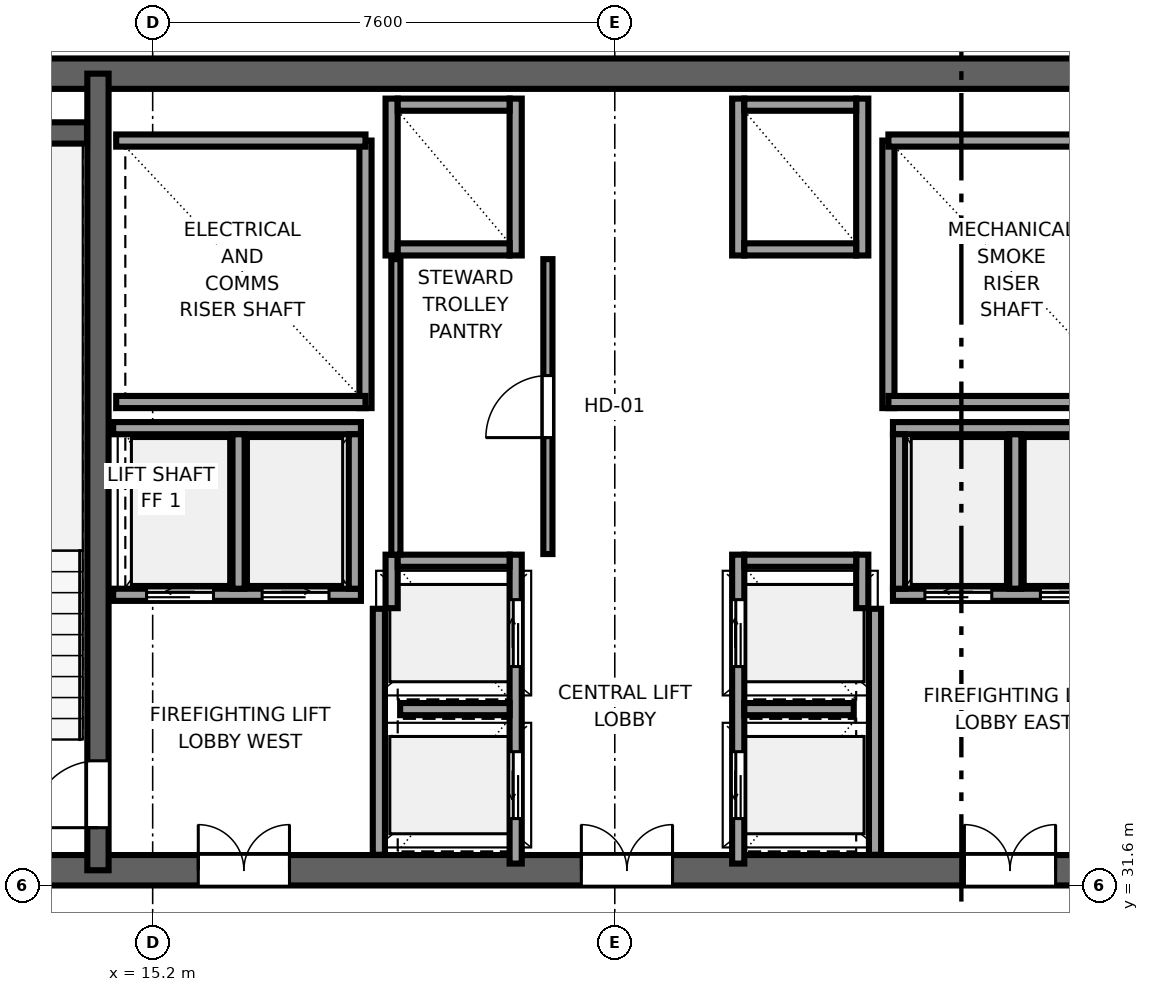
"""IFC4 building model, lengths in metres.
Left out: names, types, materials, properties, quantities, classifications, styles, units other than length and angle.
Written with IfcOpenShell. Run it as: python <this file> out.ifc"""

import sys

from ifc_helpers import new_model, si_unit, direction, frame, frame_2d, origin, place, context, subcontext, project, spatial, rectangle, extrude, source, transform, mapped, element, fill, save


model = new_model("IFC4")
c1 = context("Model", 3, precision=1e-05, world=origin(), true_north=direction((0.0, 1.0)))
c2 = subcontext(c1, "Body", "Model", "MODEL_VIEW")
j1 = project(units=[si_unit("LENGTHUNIT", "METRE"), si_unit("PLANEANGLEUNIT", "RADIAN")], contexts=[c1])
p1 = place(None, origin())
s1 = spatial("IfcSite", under=j1, at=p1, CompositionType="ELEMENT")
p2 = place(p1, origin())
s2 = spatial("IfcBuilding", under=s1, at=p2, CompositionType="ELEMENT")
p3 = place(p2, frame((0.0, 0.0, 262.95)))
s3 = spatial("IfcBuildingStorey", under=s2, at=p3, CompositionType="ELEMENT", Elevation=262.95)
p4 = place(p3, frame((10.0, 31.85, 0.0), z_axis=(0.0, 0.0, 1.0), x_axis=(1.0, 0.0, 0.0)))
e1 = element("IfcWall", 1, at=p4, inside=s3, PredefinedType="SHEAR", context=c2, shape_type="SweptSolid", body=[
    extrude(rectangle(XDim=26.0, YDim=0.5, at=frame_2d((13.0, 0.0))), origin(), (0.0, 0.0, 1.0), 3.55),
])
p5 = place(p4, frame((7.45, 0.0, 0.0), z_axis=(0.0, 0.0, 1.0), x_axis=(-1.0, 0.0, 0.0)))
e2 = element("IfcOpeningElement", 2, at=p5, cuts=e1, PredefinedType="OPENING", context=c2, shape_type="SweptSolid", body=[
    extrude(rectangle(XDim=1.5, YDim=2.04, at=frame_2d((0.75, 1.02))), frame((0.0, 0.26, 0.0), z_axis=(0.0, -1.0, 0.0), x_axis=(1.0, 0.0, 0.0)), (0.0, 0.0, 1.0), 0.52),
])
p6 = place(p4, frame((13.75, 0.0, 0.0), z_axis=(0.0, 0.0, 1.0), x_axis=(-1.0, 0.0, 0.0)))
e3 = element("IfcOpeningElement", 3, at=p6, cuts=e1, PredefinedType="OPENING", context=c2, shape_type="SweptSolid", body=[
    extrude(rectangle(XDim=1.5, YDim=2.04, at=frame_2d((0.75, 1.02))), frame((0.0, 0.26, 0.0), z_axis=(0.0, -1.0, 0.0), x_axis=(1.0, 0.0, 0.0)), (0.0, 0.0, 1.0), 0.52),
])
p7 = place(p4, frame((20.05, 0.0, 0.0), z_axis=(0.0, 0.0, 1.0), x_axis=(-1.0, 0.0, 0.0)))
e4 = element("IfcOpeningElement", 4, at=p7, cuts=e1, PredefinedType="OPENING", context=c2, shape_type="SweptSolid", body=[
    extrude(rectangle(XDim=1.5, YDim=2.04, at=frame_2d((0.75, 1.02))), frame((0.0, 0.26, 0.0), z_axis=(0.0, -1.0, 0.0), x_axis=(1.0, 0.0, 0.0)), (0.0, 0.0, 1.0), 0.52),
])
p8 = place(p3, frame((10.0, 44.95, 0.0), z_axis=(0.0, 0.0, 1.0), x_axis=(1.0, 0.0, 0.0)))
e5 = element("IfcWall", 5, at=p8, inside=s3, PredefinedType="SHEAR", context=c2, shape_type="SweptSolid", body=[
    extrude(rectangle(XDim=26.0, YDim=0.5, at=frame_2d((13.0, 0.0))), origin(), (0.0, 0.0, 1.0), 3.55),
])
p9 = place(p3, frame((14.3, 31.85, 0.0), z_axis=(0.0, 0.0, 1.0), x_axis=(0.0, 1.0, 0.0)))
e6 = element("IfcWall", 6, at=p9, inside=s3, PredefinedType="SHEAR", context=c2, shape_type="SweptSolid", body=[
    extrude(rectangle(XDim=13.1, YDim=0.35, at=frame_2d((6.55, 0.0))), origin(), (0.0, 0.0, 1.0), 3.55),
])
p10 = place(p9, frame((0.7, 0.0, 0.0)))
e7 = element("IfcOpeningElement", 7, at=p10, cuts=e6, PredefinedType="OPENING", context=c2, shape_type="SweptSolid", body=[
    extrude(rectangle(XDim=1.1, YDim=2.12, at=frame_2d((0.55, 1.06))), frame((0.0, 0.185, 0.0), z_axis=(0.0, -1.0, 0.0), x_axis=(1.0, 0.0, 0.0)), (0.0, 0.0, 1.0), 0.37),
])
p11 = place(p3, frame((10.52, 43.975, 0.0), z_axis=(0.0, 0.0, 1.0), x_axis=(1.0, 0.0, 0.0)))
e8 = element("IfcWall", 8, at=p11, inside=s3, PredefinedType="SHEAR", context=c2, shape_type="SweptSolid", body=[
    extrude(rectangle(XDim=3.6, YDim=0.35, at=frame_2d((1.8, 0.0))), origin(), (0.0, 0.0, 1.0), 3.55),
])
p12 = place(p3, frame((18.7, 39.45, 0.0), z_axis=(0.0, 0.0, 1.0), x_axis=(0.0, 1.0, 0.0)))
e9 = element("IfcWall", 9, at=p12, inside=s3, PredefinedType="SOLIDWALL", context=c2, shape_type="SweptSolid", body=[
    extrude(rectangle(XDim=4.4, YDim=0.2, at=frame_2d((2.2, 0.0))), origin(), (0.0, 0.0, 1.0), 3.37),
])
for number, where, z_axis, x_axis in (
    (10, (14.6, 39.55, 0.0), (0.0, 0.0, 1.0), (1.0, 0.0, 0.0)),
    (11, (14.6, 43.85, 0.0), (0.0, 0.0, 1.0), (1.0, 0.0, 0.0)),
):
    element("IfcWall", number, at=place(p3, frame(where, z_axis=z_axis, x_axis=x_axis)), inside=s3, PredefinedType="SOLIDWALL", context=c2, shape_type="SweptSolid", body=[
        extrude(rectangle(XDim=4.1, YDim=0.2, at=frame_2d((2.05, 0.0))), origin(), (0.0, 0.0, 1.0), 3.37),
    ])
p13 = place(p3, frame((27.3, 39.45, 0.0), z_axis=(0.0, 0.0, 1.0), x_axis=(0.0, 1.0, 0.0)))
e12 = element("IfcWall", 12, at=p13, inside=s3, PredefinedType="SOLIDWALL", context=c2, shape_type="SweptSolid", body=[
    extrude(rectangle(XDim=4.4, YDim=0.2, at=frame_2d((2.2, 0.0))), origin(), (0.0, 0.0, 1.0), 3.37),
])
for number, where, z_axis, x_axis in (
    (13, (27.3, 39.55, 0.0), (0.0, 0.0, 1.0), (1.0, 0.0, 0.0)),
    (14, (27.3, 43.85, 0.0), (0.0, 0.0, 1.0), (1.0, 0.0, 0.0)),
):
    element("IfcWall", number, at=place(p3, frame(where, z_axis=z_axis, x_axis=x_axis)), inside=s3, PredefinedType="SOLIDWALL", context=c2, shape_type="SweptSolid", body=[
        extrude(rectangle(XDim=4.1, YDim=0.2, at=frame_2d((2.05, 0.0))), origin(), (0.0, 0.0, 1.0), 3.37),
    ])
for number, where, z_axis, x_axis in (
    (15, (18.92, 32.104, 0.0), (0.0, 0.0, 1.0), (0.0, 1.0, 0.0)),
    (16, (27.08, 32.104, 0.0), (0.0, 0.0, 1.0), (0.0, 1.0, 0.0)),
):
    element("IfcWall", number, at=place(p3, frame(where, z_axis=z_axis, x_axis=x_axis)), inside=s3, PredefinedType="SOLIDWALL", context=c2, shape_type="SweptSolid", body=[
        extrude(rectangle(XDim=4.046, YDim=0.2, at=frame_2d((2.023, 0.0))), origin(), (0.0, 0.0, 1.0), 3.37),
    ])
p14 = place(p3, frame((21.17, 31.96, 0.0), z_axis=(0.0, 0.0, 1.0), x_axis=(0.0, 1.0, 0.0)))
e17 = element("IfcWall", 17, at=p14, inside=s3, PredefinedType="SOLIDWALL", context=c2, shape_type="SweptSolid", body=[
    extrude(rectangle(XDim=5.08, YDim=0.2, at=frame_2d((2.54, 0.0))), origin(), (0.0, 0.0, 1.0), 3.37),
])
p15 = place(p14, frame((0.74, 0.0, 0.0)))
e18 = element("IfcOpeningElement", 18, at=p15, cuts=e17, PredefinedType="OPENING", context=c2, shape_type="SweptSolid", body=[
    extrude(rectangle(XDim=1.1, YDim=2.12, at=frame_2d((0.55, 1.06))), frame((0.0, 0.11, 0.0), z_axis=(0.0, -1.0, 0.0), x_axis=(1.0, 0.0, 0.0)), (0.0, 0.0, 1.0), 0.22),
])
p16 = place(p14, frame((3.24, 0.0, 0.0)))
e19 = element("IfcOpeningElement", 19, at=p16, cuts=e17, PredefinedType="OPENING", context=c2, shape_type="SweptSolid", body=[
    extrude(rectangle(XDim=1.1, YDim=2.12, at=frame_2d((0.55, 1.06))), frame((0.0, 0.11, 0.0), z_axis=(0.0, -1.0, 0.0), x_axis=(1.0, 0.0, 0.0)), (0.0, 0.0, 1.0), 0.22),
])
p17 = place(p3, frame((19.13, 36.16, 0.0), z_axis=(0.0, 0.0, 1.0), x_axis=(0.0, 1.0, 0.0)))
e20 = element("IfcWall", 20, at=p17, inside=s3, PredefinedType="SOLIDWALL", context=c2, shape_type="SweptSolid", body=[
    extrude(rectangle(XDim=0.88, YDim=0.2, at=frame_2d((0.44, 0.0))), origin(), (0.0, 0.0, 1.0), 3.37),
])
p18 = place(p3, frame((19.23, 36.94, 0.0), z_axis=(0.0, 0.0, 1.0), x_axis=(1.0, 0.0, 0.0)))
e21 = element("IfcWall", 21, at=p18, inside=s3, PredefinedType="SOLIDWALL", context=c2, shape_type="SweptSolid", body=[
    extrude(rectangle(XDim=1.84, YDim=0.2, at=frame_2d((0.92, 0.0))), origin(), (0.0, 0.0, 1.0), 3.37),
])
p19 = place(p3, frame((19.27, 34.5, 0.0), z_axis=(0.0, 0.0, 1.0), x_axis=(1.0, 0.0, 0.0)))
e22 = element("IfcWall", 22, at=p19, inside=s3, PredefinedType="SOLIDWALL", context=c2, shape_type="SweptSolid", body=[
    extrude(rectangle(XDim=1.8, YDim=0.2, at=frame_2d((0.9, 0.0))), origin(), (0.0, 0.0, 1.0), 3.37),
])
for number, where, z_axis, x_axis in (
    (23, (21.17, 41.96, 0.0), (0.0, 0.0, 1.0), (0.0, 1.0, 0.0)),
    (24, (19.13, 41.96, 0.0), (0.0, 0.0, 1.0), (0.0, 1.0, 0.0)),
):
    element("IfcWall", number, at=place(p3, frame(where, z_axis=z_axis, x_axis=x_axis)), inside=s3, PredefinedType="SOLIDWALL", context=c2, shape_type="SweptSolid", body=[
        extrude(rectangle(XDim=2.58, YDim=0.2, at=frame_2d((1.29, 0.0))), origin(), (0.0, 0.0, 1.0), 3.37),
    ])
for number, where, z_axis, x_axis in (
    (25, (19.23, 42.06, 0.0), (0.0, 0.0, 1.0), (1.0, 0.0, 0.0)),
    (26, (19.23, 44.44, 0.0), (0.0, 0.0, 1.0), (1.0, 0.0, 0.0)),
):
    element("IfcWall", number, at=place(p3, frame(where, z_axis=z_axis, x_axis=x_axis)), inside=s3, PredefinedType="SOLIDWALL", context=c2, shape_type="SweptSolid", body=[
        extrude(rectangle(XDim=1.84, YDim=0.2, at=frame_2d((0.92, 0.0))), origin(), (0.0, 0.0, 1.0), 3.37),
    ])
p20 = place(p3, frame((27.375, 36.38, 0.0), z_axis=(0.0, 0.0, 1.0), x_axis=(1.0, 0.0, 0.0)))
e27 = element("IfcWall", 27, at=p20, inside=s3, PredefinedType="SOLIDWALL", context=c2, shape_type="SweptSolid", body=[
    extrude(rectangle(XDim=4.075, YDim=0.2, at=frame_2d((2.038, 0.0))), origin(), (0.0, 0.0, 1.0), 3.37),
])
p21 = place(p20, frame((0.525, 0.0, 0.0)))
e28 = element("IfcOpeningElement", 28, at=p21, cuts=e27, PredefinedType="OPENING", context=c2, shape_type="SweptSolid", body=[
    extrude(rectangle(XDim=1.1, YDim=2.12, at=frame_2d((0.55, 1.06))), frame((0.0, 0.11, 0.0), z_axis=(0.0, -1.0, 0.0), x_axis=(1.0, 0.0, 0.0)), (0.0, 0.0, 1.0), 0.22),
])
p22 = place(p20, frame((2.425, 0.0, 0.0)))
e29 = element("IfcOpeningElement", 29, at=p22, cuts=e27, PredefinedType="OPENING", context=c2, shape_type="SweptSolid", body=[
    extrude(rectangle(XDim=1.1, YDim=2.12, at=frame_2d((0.55, 1.06))), frame((0.0, 0.11, 0.0), z_axis=(0.0, -1.0, 0.0), x_axis=(1.0, 0.0, 0.0)), (0.0, 0.0, 1.0), 0.22),
])
p23 = place(p3, frame((27.375, 39.12, 0.0), z_axis=(0.0, 0.0, 1.0), x_axis=(1.0, 0.0, 0.0)))
e30 = element("IfcWall", 30, at=p23, inside=s3, PredefinedType="SOLIDWALL", context=c2, shape_type="SweptSolid", body=[
    extrude(rectangle(XDim=4.075, YDim=0.2, at=frame_2d((2.038, 0.0))), origin(), (0.0, 0.0, 1.0), 3.37),
])
for number, where, z_axis, x_axis in (
    (31, (27.475, 36.48, 0.0), (0.0, 0.0, 1.0), (0.0, 1.0, 0.0)),
    (32, (29.387, 36.48, 0.0), (0.0, 0.0, 1.0), (0.0, 1.0, 0.0)),
):
    element("IfcWall", number, at=place(p3, frame(where, z_axis=z_axis, x_axis=x_axis)), inside=s3, PredefinedType="SOLIDWALL", context=c2, shape_type="SweptSolid", body=[
        extrude(rectangle(XDim=2.54, YDim=0.2, at=frame_2d((1.27, 0.0))), origin(), (0.0, 0.0, 1.0), 3.37),
    ])
p24 = place(p3, frame((14.55, 36.38, 0.0), z_axis=(0.0, 0.0, 1.0), x_axis=(1.0, 0.0, 0.0)))
e33 = element("IfcWall", 33, at=p24, inside=s3, PredefinedType="SOLIDWALL", context=c2, shape_type="SweptSolid", body=[
    extrude(rectangle(XDim=4.075, YDim=0.2, at=frame_2d((2.038, 0.0))), origin(), (0.0, 0.0, 1.0), 3.37),
])
p25 = place(p24, frame((0.55, 0.0, 0.0)))
e34 = element("IfcOpeningElement", 34, at=p25, cuts=e33, PredefinedType="OPENING", context=c2, shape_type="SweptSolid", body=[
    extrude(rectangle(XDim=1.1, YDim=2.12, at=frame_2d((0.55, 1.06))), frame((0.0, 0.11, 0.0), z_axis=(0.0, -1.0, 0.0), x_axis=(1.0, 0.0, 0.0)), (0.0, 0.0, 1.0), 0.22),
])
p26 = place(p24, frame((2.45, 0.0, 0.0)))
e35 = element("IfcOpeningElement", 35, at=p26, cuts=e33, PredefinedType="OPENING", context=c2, shape_type="SweptSolid", body=[
    extrude(rectangle(XDim=1.1, YDim=2.12, at=frame_2d((0.55, 1.06))), frame((0.0, 0.11, 0.0), z_axis=(0.0, -1.0, 0.0), x_axis=(1.0, 0.0, 0.0)), (0.0, 0.0, 1.0), 0.22),
])
p27 = place(p3, frame((14.55, 39.12, 0.0), z_axis=(0.0, 0.0, 1.0), x_axis=(1.0, 0.0, 0.0)))
e36 = element("IfcWall", 36, at=p27, inside=s3, PredefinedType="SOLIDWALL", context=c2, shape_type="SweptSolid", body=[
    extrude(rectangle(XDim=4.075, YDim=0.2, at=frame_2d((2.038, 0.0))), origin(), (0.0, 0.0, 1.0), 3.37),
])
for number, where, z_axis, x_axis in (
    (37, (18.525, 36.48, 0.0), (0.0, 0.0, 1.0), (0.0, 1.0, 0.0)),
    (38, (16.613, 36.48, 0.0), (0.0, 0.0, 1.0), (0.0, 1.0, 0.0)),
):
    element("IfcWall", number, at=place(p3, frame(where, z_axis=z_axis, x_axis=x_axis)), inside=s3, PredefinedType="SOLIDWALL", context=c2, shape_type="SweptSolid", body=[
        extrude(rectangle(XDim=2.54, YDim=0.2, at=frame_2d((1.27, 0.0))), origin(), (0.0, 0.0, 1.0), 3.37),
    ])
p28 = place(p3, frame((24.83, 31.96, 0.0), z_axis=(0.0, 0.0, 1.0), x_axis=(0.0, 1.0, 0.0)))
e39 = element("IfcWall", 39, at=p28, inside=s3, PredefinedType="SOLIDWALL", context=c2, shape_type="SweptSolid", body=[
    extrude(rectangle(XDim=5.08, YDim=0.2, at=frame_2d((2.54, 0.0))), origin(), (0.0, 0.0, 1.0), 3.37),
])
p29 = place(p28, frame((0.74, 0.0, 0.0)))
e40 = element("IfcOpeningElement", 40, at=p29, cuts=e39, PredefinedType="OPENING", context=c2, shape_type="SweptSolid", body=[
    extrude(rectangle(XDim=1.1, YDim=2.12, at=frame_2d((0.55, 1.06))), frame((0.0, 0.11, 0.0), z_axis=(0.0, -1.0, 0.0), x_axis=(1.0, 0.0, 0.0)), (0.0, 0.0, 1.0), 0.22),
])
p30 = place(p28, frame((3.24, 0.0, 0.0)))
e41 = element("IfcOpeningElement", 41, at=p30, cuts=e39, PredefinedType="OPENING", context=c2, shape_type="SweptSolid", body=[
    extrude(rectangle(XDim=1.1, YDim=2.12, at=frame_2d((0.55, 1.06))), frame((0.0, 0.11, 0.0), z_axis=(0.0, -1.0, 0.0), x_axis=(1.0, 0.0, 0.0)), (0.0, 0.0, 1.0), 0.22),
])
p31 = place(p3, frame((26.87, 36.16, 0.0), z_axis=(0.0, 0.0, 1.0), x_axis=(0.0, 1.0, 0.0)))
e42 = element("IfcWall", 42, at=p31, inside=s3, PredefinedType="SOLIDWALL", context=c2, shape_type="SweptSolid", body=[
    extrude(rectangle(XDim=0.88, YDim=0.2, at=frame_2d((0.44, 0.0))), origin(), (0.0, 0.0, 1.0), 3.37),
])
p32 = place(p3, frame((24.93, 36.94, 0.0), z_axis=(0.0, 0.0, 1.0), x_axis=(1.0, 0.0, 0.0)))
e43 = element("IfcWall", 43, at=p32, inside=s3, PredefinedType="SOLIDWALL", context=c2, shape_type="SweptSolid", body=[
    extrude(rectangle(XDim=1.84, YDim=0.2, at=frame_2d((0.92, 0.0))), origin(), (0.0, 0.0, 1.0), 3.37),
])
p33 = place(p3, frame((24.93, 34.5, 0.0), z_axis=(0.0, 0.0, 1.0), x_axis=(1.0, 0.0, 0.0)))
e44 = element("IfcWall", 44, at=p33, inside=s3, PredefinedType="SOLIDWALL", context=c2, shape_type="SweptSolid", body=[
    extrude(rectangle(XDim=1.8, YDim=0.2, at=frame_2d((0.9, 0.0))), origin(), (0.0, 0.0, 1.0), 3.37),
])
for number, where, z_axis, x_axis in (
    (45, (24.83, 41.96, 0.0), (0.0, 0.0, 1.0), (0.0, 1.0, 0.0)),
    (46, (26.87, 41.96, 0.0), (0.0, 0.0, 1.0), (0.0, 1.0, 0.0)),
):
    element("IfcWall", number, at=place(p3, frame(where, z_axis=z_axis, x_axis=x_axis)), inside=s3, PredefinedType="SOLIDWALL", context=c2, shape_type="SweptSolid", body=[
        extrude(rectangle(XDim=2.58, YDim=0.2, at=frame_2d((1.29, 0.0))), origin(), (0.0, 0.0, 1.0), 3.37),
    ])
for number, where, z_axis, x_axis in (
    (47, (24.93, 42.06, 0.0), (0.0, 0.0, 1.0), (1.0, 0.0, 0.0)),
    (48, (24.93, 44.44, 0.0), (0.0, 0.0, 1.0), (1.0, 0.0, 0.0)),
):
    element("IfcWall", number, at=place(p3, frame(where, z_axis=z_axis, x_axis=x_axis)), inside=s3, PredefinedType="SOLIDWALL", context=c2, shape_type="SweptSolid", body=[
        extrude(rectangle(XDim=1.84, YDim=0.2, at=frame_2d((0.92, 0.0))), origin(), (0.0, 0.0, 1.0), 3.37),
    ])
p34 = place(p3, frame((21.7, 37.05, 0.0), z_axis=(0.0, 0.0, 1.0), x_axis=(0.0, 1.0, 0.0)))
e49 = element("IfcWall", 49, at=p34, inside=s3, PredefinedType="PARTITIONING", context=c2, shape_type="SweptSolid", body=[
    extrude(rectangle(XDim=4.85, YDim=0.15, at=frame_2d((2.425, 0.0))), origin(), (0.0, 0.0, 1.0), 3.37),
])
p35 = place(p34, frame((1.915, 0.0, 0.0)))
e50 = element("IfcOpeningElement", 50, at=p35, cuts=e49, PredefinedType="OPENING", context=c2, shape_type="SweptSolid", body=[
    extrude(rectangle(XDim=1.02, YDim=2.03, at=frame_2d((0.51, 1.015))), frame((0.0, 0.085, 0.0), z_axis=(0.0, -1.0, 0.0), x_axis=(1.0, 0.0, 0.0)), (0.0, 0.0, 1.0), 0.17),
])
p36 = place(p3, frame((19.2, 37.04, 0.0), z_axis=(0.0, 0.0, 1.0), x_axis=(0.0, 1.0, 0.0)))
e51 = element("IfcWall", 51, at=p36, inside=s3, PredefinedType="PARTITIONING", context=c2, shape_type="SweptSolid", body=[
    extrude(rectangle(XDim=4.86, YDim=0.15, at=frame_2d((2.43, 0.0))), origin(), (0.0, 0.0, 1.0), 3.37),
])
m1 = source(origin(), c2, "Body", "SweptSolid", [
    extrude(rectangle(XDim=1.1, YDim=2.12, at=frame_2d((0.55, 1.06))), frame((0.0, 0.025, 0.0), z_axis=(0.0, -1.0, 0.0), x_axis=(1.0, 0.0, 0.0)), (0.0, 0.0, 1.0), 0.05),
])
p37 = place(p10, origin())
e52 = element("IfcDoor", 52, at=p37, inside=s3, OperationType="SINGLE_SWING_LEFT", PredefinedType="DOOR", context=c2, shape_type="MappedRepresentation", body=[
    mapped(m1, transform((0.0, 0.0, 0.0), x_axis=(1.0, 0.0, 0.0), y_axis=(0.0, 1.0, 0.0), z_axis=(0.0, 0.0, 1.0), scale=1.0)),
])
fill(e7, e52)
m2 = source(origin(), c2, "Body", "SweptSolid", [
    extrude(rectangle(XDim=1.5, YDim=2.04, at=frame_2d((0.75, 1.02))), frame((0.0, 0.025, 0.0), z_axis=(0.0, -1.0, 0.0), x_axis=(1.0, 0.0, 0.0)), (0.0, 0.0, 1.0), 0.05),
])
p38 = place(p5, origin())
e53 = element("IfcDoor", 53, at=p38, inside=s3, OperationType="DOUBLE_DOOR_SINGLE_SWING", PredefinedType="DOOR", context=c2, shape_type="MappedRepresentation", body=[
    mapped(m2, transform((0.0, 0.0, 0.0), x_axis=(1.0, 0.0, 0.0), y_axis=(0.0, 1.0, 0.0), z_axis=(0.0, 0.0, 1.0), scale=1.0)),
])
fill(e2, e53)
p39 = place(p6, origin())
e54 = element("IfcDoor", 54, at=p39, inside=s3, OperationType="DOUBLE_DOOR_SINGLE_SWING", PredefinedType="DOOR", context=c2, shape_type="MappedRepresentation", body=[
    mapped(m2, transform((0.0, 0.0, 0.0), x_axis=(1.0, 0.0, 0.0), y_axis=(0.0, 1.0, 0.0), z_axis=(0.0, 0.0, 1.0), scale=1.0)),
])
fill(e3, e54)
p40 = place(p7, origin())
e55 = element("IfcDoor", 55, at=p40, inside=s3, OperationType="DOUBLE_DOOR_SINGLE_SWING", PredefinedType="DOOR", context=c2, shape_type="MappedRepresentation", body=[
    mapped(m2, transform((0.0, 0.0, 0.0), x_axis=(1.0, 0.0, 0.0), y_axis=(0.0, 1.0, 0.0), z_axis=(0.0, 0.0, 1.0), scale=1.0)),
])
fill(e4, e55)
m3 = source(origin(), c2, "Body", "SweptSolid", [
    extrude(rectangle(XDim=1.1, YDim=2.12, at=frame_2d((0.55, 1.06))), frame((0.0, 0.025, 0.0), z_axis=(0.0, -1.0, 0.0), x_axis=(1.0, 0.0, 0.0)), (0.0, 0.0, 1.0), 0.05),
])
p41 = place(p15, origin())
e56 = element("IfcDoor", 56, at=p41, inside=s3, OperationType="SLIDING_TO_LEFT", PredefinedType="DOOR", context=c2, shape_type="MappedRepresentation", body=[
    mapped(m3, transform((0.0, 0.0, 0.0), x_axis=(1.0, 0.0, 0.0), y_axis=(0.0, 1.0, 0.0), z_axis=(0.0, 0.0, 1.0), scale=1.0)),
])
fill(e18, e56)
p42 = place(p16, origin())
e57 = element("IfcDoor", 57, at=p42, inside=s3, OperationType="SLIDING_TO_RIGHT", PredefinedType="DOOR", context=c2, shape_type="MappedRepresentation", body=[
    mapped(m3, transform((0.0, 0.0, 0.0), x_axis=(1.0, 0.0, 0.0), y_axis=(0.0, 1.0, 0.0), z_axis=(0.0, 0.0, 1.0), scale=1.0)),
])
fill(e19, e57)
p43 = place(p21, origin())
e58 = element("IfcDoor", 58, at=p43, inside=s3, OperationType="SLIDING_TO_LEFT", PredefinedType="DOOR", context=c2, shape_type="MappedRepresentation", body=[
    mapped(m3, transform((0.0, 0.0, 0.0), x_axis=(1.0, 0.0, 0.0), y_axis=(0.0, 1.0, 0.0), z_axis=(0.0, 0.0, 1.0), scale=1.0)),
])
fill(e28, e58)
p44 = place(p22, origin())
e59 = element("IfcDoor", 59, at=p44, inside=s3, OperationType="SLIDING_TO_RIGHT", PredefinedType="DOOR", context=c2, shape_type="MappedRepresentation", body=[
    mapped(m3, transform((0.0, 0.0, 0.0), x_axis=(1.0, 0.0, 0.0), y_axis=(0.0, 1.0, 0.0), z_axis=(0.0, 0.0, 1.0), scale=1.0)),
])
fill(e29, e59)
p45 = place(p25, origin())
e60 = element("IfcDoor", 60, at=p45, inside=s3, OperationType="SLIDING_TO_LEFT", PredefinedType="DOOR", context=c2, shape_type="MappedRepresentation", body=[
    mapped(m3, transform((0.0, 0.0, 0.0), x_axis=(1.0, 0.0, 0.0), y_axis=(0.0, 1.0, 0.0), z_axis=(0.0, 0.0, 1.0), scale=1.0)),
])
fill(e34, e60)
p46 = place(p26, origin())
e61 = element("IfcDoor", 61, at=p46, inside=s3, OperationType="SLIDING_TO_RIGHT", PredefinedType="DOOR", context=c2, shape_type="MappedRepresentation", body=[
    mapped(m3, transform((0.0, 0.0, 0.0), x_axis=(1.0, 0.0, 0.0), y_axis=(0.0, 1.0, 0.0), z_axis=(0.0, 0.0, 1.0), scale=1.0)),
])
fill(e35, e61)
p47 = place(p29, origin())
e62 = element("IfcDoor", 62, at=p47, inside=s3, OperationType="SLIDING_TO_LEFT", PredefinedType="DOOR", context=c2, shape_type="MappedRepresentation", body=[
    mapped(m3, transform((0.0, 0.0, 0.0), x_axis=(1.0, 0.0, 0.0), y_axis=(0.0, 1.0, 0.0), z_axis=(0.0, 0.0, 1.0), scale=1.0)),
])
fill(e40, e62)
p48 = place(p30, origin())
e63 = element("IfcDoor", 63, at=p48, inside=s3, OperationType="SLIDING_TO_RIGHT", PredefinedType="DOOR", context=c2, shape_type="MappedRepresentation", body=[
    mapped(m3, transform((0.0, 0.0, 0.0), x_axis=(1.0, 0.0, 0.0), y_axis=(0.0, 1.0, 0.0), z_axis=(0.0, 0.0, 1.0), scale=1.0)),
])
fill(e41, e63)
m4 = source(origin(), c2, "Body", "SweptSolid", [
    extrude(rectangle(XDim=1.02, YDim=2.03, at=frame_2d((0.51, 1.015))), frame((0.0, 0.025, 0.0), z_axis=(0.0, -1.0, 0.0), x_axis=(1.0, 0.0, 0.0)), (0.0, 0.0, 1.0), 0.05),
])
p49 = place(p35, origin())
e64 = element("IfcDoor", 64, at=p49, inside=s3, OperationType="SINGLE_SWING_LEFT", PredefinedType="DOOR", context=c2, shape_type="MappedRepresentation", body=[
    mapped(m4, transform((0.0, 0.0, 0.0), x_axis=(1.0, 0.0, 0.0), y_axis=(0.0, 1.0, 0.0), z_axis=(0.0, 0.0, 1.0), scale=1.0)),
])
fill(e50, e64)
save(model, sys.argv[1])
